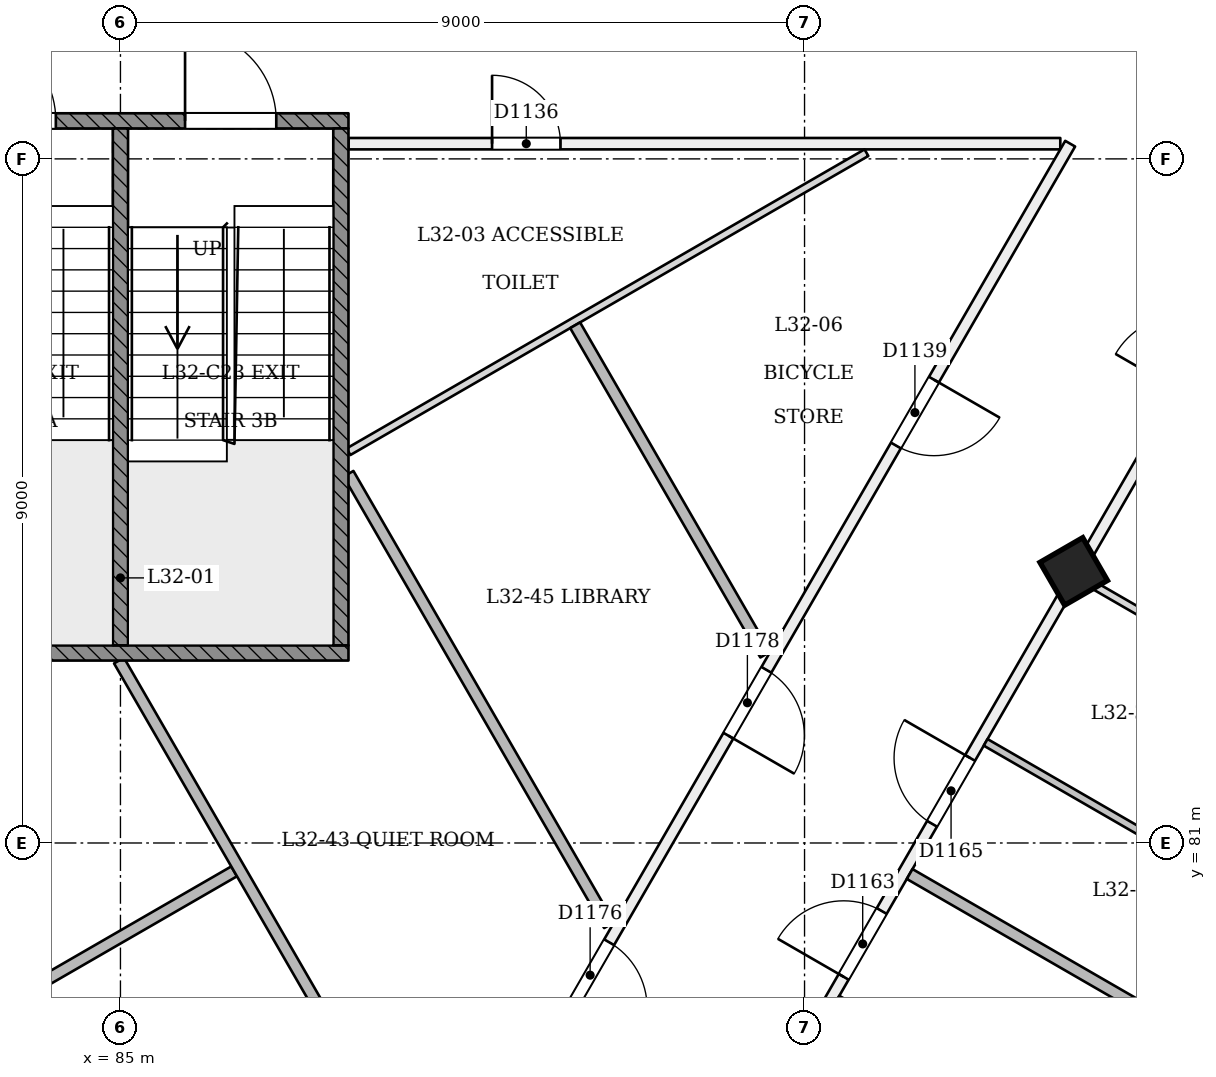
"""IFC4 building model, lengths in metres.
Left out: names, types, materials, properties, quantities, classifications, styles, units other than length and angle.
Written with IfcOpenShell. Run it as: python <this file> out.ifc"""

import sys

from ifc_helpers import new_model, si_unit, direction, frame, frame_2d, origin, origin_2d, place, context, subcontext, project, spatial, rectangle, extrude, element, fill, save


model = new_model("IFC4")
c1 = context("Model", 3, precision=1e-05, world=origin(), true_north=direction((0.0, 1.0)))
c2 = subcontext(c1, "Body", "Model", "MODEL_VIEW")
j1 = project(units=[si_unit("LENGTHUNIT", "METRE"), si_unit("PLANEANGLEUNIT", "RADIAN")], contexts=[c1])
p1 = place(None, origin())
s1 = spatial("IfcSite", under=j1, at=p1, CompositionType="ELEMENT")
p2 = place(p1, origin())
s2 = spatial("IfcBuilding", under=s1, at=p2, CompositionType="ELEMENT")
p3 = place(p2, frame((0.0, 0.0, 127.8)))
s3 = spatial("IfcBuildingStorey", under=s2, at=p3, CompositionType="ELEMENT", Elevation=127.8)
p4 = place(p3, frame((97.568, 84.526, -0.02), z_axis=(-0.02222134892, 0.038480872521, 0.999012229206), x_axis=(-0.500169939593, -0.865642180581, 0.022218162104)))
e1 = element("IfcColumn", 1, at=p4, inside=s3, PredefinedType="COLUMN", context=c2, shape_type="SweptSolid", body=[
    extrude(rectangle(XDim=0.65, YDim=0.65, at=origin_2d()), origin(), (0.0, 0.0, 1.0), 3.604),
])
p5 = place(p3, frame((85.0, 68.559, 0.0), z_axis=(0.0, 0.0, 1.0), x_axis=(-0.499999561005, 0.866025657238, 0.0)))
e2 = element("IfcWall", 2, at=p5, inside=s3, PredefinedType="PARTITIONING", context=c2, shape_type="SweptSolid", body=[
    extrude(rectangle(XDim=24.989, YDim=0.15, at=frame_2d((12.495, 0.0))), origin(), (0.0, 0.0, 1.0), 3.15),
])
p6 = place(p5, frame((2.515, 0.0, 0.0)))
e3 = element("IfcOpeningElement", 3, at=p6, cuts=e2, PredefinedType="OPENING", context=c2, shape_type="SweptSolid", body=[
    extrude(rectangle(XDim=0.9, YDim=2.1, at=frame_2d((0.45, 1.05))), frame((0.0, 0.085, 0.0), z_axis=(0.0, -1.0, 0.0), x_axis=(1.0, 0.0, 0.0)), (0.0, 0.0, 1.0), 0.171),
])
p7 = place(p5, frame((15.573, 0.0, 0.0)))
e4 = element("IfcOpeningElement", 4, at=p7, cuts=e2, PredefinedType="OPENING", context=c2, shape_type="SweptSolid", body=[
    extrude(rectangle(XDim=1.0, YDim=2.1, at=frame_2d((0.5, 1.05))), frame((0.0, 0.085, 0.0), z_axis=(0.0, -1.0, 0.0), x_axis=(1.0, 0.0, 0.0)), (0.0, 0.0, 1.0), 0.171),
])
p8 = place(p5, frame((7.186, 0.0, 0.0)))
e5 = element("IfcOpeningElement", 5, at=p8, cuts=e2, PredefinedType="OPENING", context=c2, shape_type="SweptSolid", body=[
    extrude(rectangle(XDim=1.0, YDim=2.1, at=frame_2d((0.5, 1.05))), frame((0.0, 0.085, 0.0), z_axis=(0.0, -1.0, 0.0), x_axis=(1.0, 0.0, 0.0)), (0.0, 0.0, 1.0), 0.171),
])
p9 = place(p5, frame((11.179, 0.0, 0.0)))
e6 = element("IfcOpeningElement", 6, at=p9, cuts=e2, PredefinedType="OPENING", context=c2, shape_type="SweptSolid", body=[
    extrude(rectangle(XDim=1.0, YDim=2.1, at=frame_2d((0.5, 1.05))), frame((0.0, 0.085, 0.0), z_axis=(0.0, -1.0, 0.0), x_axis=(1.0, 0.0, 0.0)), (0.0, 0.0, 1.0), 0.171),
])
p10 = place(p5, frame((20.607, 0.0, 0.0)))
e7 = element("IfcOpeningElement", 7, at=p10, cuts=e2, PredefinedType="OPENING", context=c2, shape_type="SweptSolid", body=[
    extrude(rectangle(XDim=1.0, YDim=2.1, at=frame_2d((0.5, 1.05))), frame((0.0, 0.085, 0.0), z_axis=(0.0, -1.0, 0.0), x_axis=(1.0, 0.0, 0.0)), (0.0, 0.0, 1.0), 0.171),
])
p11 = place(p3, frame((88.0, 90.2, 0.0), z_axis=(0.0, 0.0, 1.0), x_axis=(1.0, 0.0, 0.0)))
e8 = element("IfcWall", 8, at=p11, inside=s3, PredefinedType="PARTITIONING", context=c2, shape_type="SweptSolid", body=[
    extrude(rectangle(XDim=9.365, YDim=0.15, at=frame_2d((4.682, 0.0))), origin(), (0.0, 0.0, 1.0), 3.15),
])
p12 = place(p11, frame((1.889, 0.0, 0.0)))
e9 = element("IfcOpeningElement", 9, at=p12, cuts=e8, PredefinedType="OPENING", context=c2, shape_type="SweptSolid", body=[
    extrude(rectangle(XDim=0.9, YDim=2.1, at=frame_2d((0.45, 1.05))), frame((0.0, 0.085, 0.0), z_axis=(0.0, -1.0, 0.0), x_axis=(1.0, 0.0, 0.0)), (0.0, 0.0, 1.0), 0.171),
])
p13 = place(p3, frame((97.495, 90.2, 0.0), z_axis=(0.0, 0.0, 1.0), x_axis=(-0.500000725976, -0.866024984641, 0.0)))
e10 = element("IfcWall", 10, at=p13, inside=s3, PredefinedType="PARTITIONING", context=c2, shape_type="SweptSolid", body=[
    extrude(rectangle(XDim=24.859, YDim=0.15, at=frame_2d((12.43, 0.0))), origin(), (0.0, 0.0, 1.0), 3.15),
])
p14 = place(p13, frame((17.98, 0.0, 0.0)))
e11 = element("IfcOpeningElement", 11, at=p14, cuts=e10, PredefinedType="OPENING", context=c2, shape_type="SweptSolid", body=[
    extrude(rectangle(XDim=1.0, YDim=2.1, at=frame_2d((0.5, 1.05))), frame((0.0, 0.085, 0.0), z_axis=(0.0, -1.0, 0.0), x_axis=(1.0, 0.0, 0.0)), (0.0, 0.0, 1.0), 0.171),
])
p15 = place(p13, frame((3.585, 0.0, 0.0)))
e12 = element("IfcOpeningElement", 12, at=p15, cuts=e10, PredefinedType="OPENING", context=c2, shape_type="SweptSolid", body=[
    extrude(rectangle(XDim=1.0, YDim=2.1, at=frame_2d((0.5, 1.05))), frame((0.0, 0.085, 0.0), z_axis=(0.0, -1.0, 0.0), x_axis=(1.0, 0.0, 0.0)), (0.0, 0.0, 1.0), 0.171),
])
p16 = place(p13, frame((12.131, 0.0, 0.0)))
e13 = element("IfcOpeningElement", 13, at=p16, cuts=e10, PredefinedType="OPENING", context=c2, shape_type="SweptSolid", body=[
    extrude(rectangle(XDim=1.0, YDim=2.1, at=frame_2d((0.5, 1.05))), frame((0.0, 0.085, 0.0), z_axis=(0.0, -1.0, 0.0), x_axis=(1.0, 0.0, 0.0)), (0.0, 0.0, 1.0), 0.171),
])
p17 = place(p13, frame((7.993, 0.0, 0.0)))
e14 = element("IfcOpeningElement", 14, at=p17, cuts=e10, PredefinedType="OPENING", context=c2, shape_type="SweptSolid", body=[
    extrude(rectangle(XDim=1.0, YDim=2.1, at=frame_2d((0.5, 1.05))), frame((0.0, 0.085, 0.0), z_axis=(0.0, -1.0, 0.0), x_axis=(1.0, 0.0, 0.0)), (0.0, 0.0, 1.0), 0.171),
])
p18 = place(p3, frame((64.534, 98.206, 0.0), z_axis=(0.0, 0.0, 1.0), x_axis=(0.499999603446, -0.866025632735, 0.0)))
e15 = element("IfcWall", 15, at=p18, inside=s3, PredefinedType="PARTITIONING", context=c2, shape_type="SweptSolid", body=[
    extrude(rectangle(XDim=40.592, YDim=0.15, at=frame_2d((20.296, 0.0))), origin(), (0.0, 0.0, 1.0), 2.75),
])
p19 = place(p18, frame((0.2, 0.0, 0.0)))
e16 = element("IfcOpeningElement", 16, at=p19, cuts=e15, PredefinedType="OPENING", context=c2, shape_type="SweptSolid", body=[
    extrude(rectangle(XDim=1.2, YDim=2.1, at=frame_2d((0.6, 1.05))), frame((0.0, 0.085, 0.0), z_axis=(0.0, -1.0, 0.0), x_axis=(1.0, 0.0, 0.0)), (0.0, 0.0, 1.0), 0.171),
])
p20 = place(p18, frame((3.016, 0.0, 0.0)))
e17 = element("IfcOpeningElement", 17, at=p20, cuts=e15, PredefinedType="OPENING", context=c2, shape_type="SweptSolid", body=[
    extrude(rectangle(XDim=1.0, YDim=2.1, at=frame_2d((0.5, 1.05))), frame((0.0, 0.085, 0.0), z_axis=(0.0, -1.0, 0.0), x_axis=(1.0, 0.0, 0.0)), (0.0, 0.0, 1.0), 0.171),
])
p21 = place(p18, frame((9.691, 0.0, 0.0)))
e18 = element("IfcOpeningElement", 18, at=p21, cuts=e15, PredefinedType="OPENING", context=c2, shape_type="SweptSolid", body=[
    extrude(rectangle(XDim=1.0, YDim=2.1, at=frame_2d((0.5, 1.05))), frame((0.0, 0.085, 0.0), z_axis=(0.0, -1.0, 0.0), x_axis=(1.0, 0.0, 0.0)), (0.0, 0.0, 1.0), 0.171),
])
p22 = place(p18, frame((11.901, 0.0, 0.0)))
e19 = element("IfcOpeningElement", 19, at=p22, cuts=e15, PredefinedType="OPENING", context=c2, shape_type="SweptSolid", body=[
    extrude(rectangle(XDim=1.0, YDim=2.1, at=frame_2d((0.5, 1.05))), frame((0.0, 0.085, 0.0), z_axis=(0.0, -1.0, 0.0), x_axis=(1.0, 0.0, 0.0)), (0.0, 0.0, 1.0), 0.171),
])
p23 = place(p18, frame((18.576, 0.0, 0.0)))
e20 = element("IfcOpeningElement", 20, at=p23, cuts=e15, PredefinedType="OPENING", context=c2, shape_type="SweptSolid", body=[
    extrude(rectangle(XDim=1.0, YDim=2.1, at=frame_2d((0.5, 1.05))), frame((0.0, 0.085, 0.0), z_axis=(0.0, -1.0, 0.0), x_axis=(1.0, 0.0, 0.0)), (0.0, 0.0, 1.0), 0.171),
])
p24 = place(p18, frame((22.046, 0.0, 0.0)))
e21 = element("IfcOpeningElement", 21, at=p24, cuts=e15, PredefinedType="OPENING", context=c2, shape_type="SweptSolid", body=[
    extrude(rectangle(XDim=1.0, YDim=2.1, at=frame_2d((0.5, 1.05))), frame((0.0, 0.085, 0.0), z_axis=(0.0, -1.0, 0.0), x_axis=(1.0, 0.0, 0.0)), (0.0, 0.0, 1.0), 0.171),
])
p25 = place(p18, frame((27.576, 0.0, 0.0)))
e22 = element("IfcOpeningElement", 22, at=p25, cuts=e15, PredefinedType="OPENING", context=c2, shape_type="SweptSolid", body=[
    extrude(rectangle(XDim=1.0, YDim=2.1, at=frame_2d((0.5, 1.05))), frame((0.0, 0.085, 0.0), z_axis=(0.0, -1.0, 0.0), x_axis=(1.0, 0.0, 0.0)), (0.0, 0.0, 1.0), 0.171),
])
p26 = place(p18, frame((31.046, 0.0, 0.0)))
e23 = element("IfcOpeningElement", 23, at=p26, cuts=e15, PredefinedType="OPENING", context=c2, shape_type="SweptSolid", body=[
    extrude(rectangle(XDim=1.0, YDim=2.1, at=frame_2d((0.5, 1.05))), frame((0.0, 0.085, 0.0), z_axis=(0.0, -1.0, 0.0), x_axis=(1.0, 0.0, 0.0)), (0.0, 0.0, 1.0), 0.171),
])
p27 = place(p18, frame((36.576, 0.0, 0.0)))
e24 = element("IfcOpeningElement", 24, at=p27, cuts=e15, PredefinedType="OPENING", context=c2, shape_type="SweptSolid", body=[
    extrude(rectangle(XDim=1.0, YDim=2.1, at=frame_2d((0.5, 1.05))), frame((0.0, 0.085, 0.0), z_axis=(0.0, -1.0, 0.0), x_axis=(1.0, 0.0, 0.0)), (0.0, 0.0, 1.0), 0.171),
])
p28 = place(p18, frame((39.323, 0.0, 0.0)))
e25 = element("IfcOpeningElement", 25, at=p28, cuts=e15, PredefinedType="OPENING", context=c2, shape_type="SweptSolid", body=[
    extrude(rectangle(XDim=1.0, YDim=2.1, at=frame_2d((0.5, 1.05))), frame((0.0, 0.085, 0.0), z_axis=(0.0, -1.0, 0.0), x_axis=(1.0, 0.0, 0.0)), (0.0, 0.0, 1.0), 0.171),
])
p29 = place(p3, frame((85.17, 63.052, 0.0), z_axis=(0.0, 0.0, 1.0), x_axis=(0.499999603446, 0.866025632735, 0.0)))
e26 = element("IfcWall", 26, at=p29, inside=s3, PredefinedType="PARTITIONING", context=c2, shape_type="SweptSolid", body=[
    extrude(rectangle(XDim=40.592, YDim=0.15, at=frame_2d((20.296, 0.0))), origin(), (0.0, 0.0, 1.0), 2.75),
])
p30 = place(p29, frame((0.273, 0.0, 0.0)))
e27 = element("IfcOpeningElement", 27, at=p30, cuts=e26, PredefinedType="OPENING", context=c2, shape_type="SweptSolid", body=[
    extrude(rectangle(XDim=1.2, YDim=2.1, at=frame_2d((0.6, 1.05))), frame((0.0, 0.085, 0.0), z_axis=(0.0, -1.0, 0.0), x_axis=(1.0, 0.0, 0.0)), (0.0, 0.0, 1.0), 0.171),
])
p31 = place(p29, frame((4.046, 0.0, 0.0)))
e28 = element("IfcOpeningElement", 28, at=p31, cuts=e26, PredefinedType="OPENING", context=c2, shape_type="SweptSolid", body=[
    extrude(rectangle(XDim=1.0, YDim=2.1, at=frame_2d((0.5, 1.05))), frame((0.0, 0.085, 0.0), z_axis=(0.0, -1.0, 0.0), x_axis=(1.0, 0.0, 0.0)), (0.0, 0.0, 1.0), 0.171),
])
p32 = place(p29, frame((9.576, 0.0, 0.0)))
e29 = element("IfcOpeningElement", 29, at=p32, cuts=e26, PredefinedType="OPENING", context=c2, shape_type="SweptSolid", body=[
    extrude(rectangle(XDim=1.0, YDim=2.1, at=frame_2d((0.5, 1.05))), frame((0.0, 0.085, 0.0), z_axis=(0.0, -1.0, 0.0), x_axis=(1.0, 0.0, 0.0)), (0.0, 0.0, 1.0), 0.171),
])
p33 = place(p29, frame((11.901, 0.0, 0.0)))
e30 = element("IfcOpeningElement", 30, at=p33, cuts=e26, PredefinedType="OPENING", context=c2, shape_type="SweptSolid", body=[
    extrude(rectangle(XDim=1.0, YDim=2.1, at=frame_2d((0.5, 1.05))), frame((0.0, 0.085, 0.0), z_axis=(0.0, -1.0, 0.0), x_axis=(1.0, 0.0, 0.0)), (0.0, 0.0, 1.0), 0.171),
])
p34 = place(p29, frame((18.691, 0.0, 0.0)))
e31 = element("IfcOpeningElement", 31, at=p34, cuts=e26, PredefinedType="OPENING", context=c2, shape_type="SweptSolid", body=[
    extrude(rectangle(XDim=1.0, YDim=2.1, at=frame_2d((0.5, 1.05))), frame((0.0, 0.085, 0.0), z_axis=(0.0, -1.0, 0.0), x_axis=(1.0, 0.0, 0.0)), (0.0, 0.0, 1.0), 0.171),
])
p35 = place(p29, frame((21.016, 0.0, 0.0)))
e32 = element("IfcOpeningElement", 32, at=p35, cuts=e26, PredefinedType="OPENING", context=c2, shape_type="SweptSolid", body=[
    extrude(rectangle(XDim=1.0, YDim=2.1, at=frame_2d((0.5, 1.05))), frame((0.0, 0.085, 0.0), z_axis=(0.0, -1.0, 0.0), x_axis=(1.0, 0.0, 0.0)), (0.0, 0.0, 1.0), 0.171),
])
p36 = place(p29, frame((27.576, 0.0, 0.0)))
e33 = element("IfcOpeningElement", 33, at=p36, cuts=e26, PredefinedType="OPENING", context=c2, shape_type="SweptSolid", body=[
    extrude(rectangle(XDim=1.0, YDim=2.1, at=frame_2d((0.5, 1.05))), frame((0.0, 0.085, 0.0), z_axis=(0.0, -1.0, 0.0), x_axis=(1.0, 0.0, 0.0)), (0.0, 0.0, 1.0), 0.171),
])
p37 = place(p29, frame((30.016, 0.0, 0.0)))
e34 = element("IfcOpeningElement", 34, at=p37, cuts=e26, PredefinedType="OPENING", context=c2, shape_type="SweptSolid", body=[
    extrude(rectangle(XDim=1.0, YDim=2.1, at=frame_2d((0.5, 1.05))), frame((0.0, 0.085, 0.0), z_axis=(0.0, -1.0, 0.0), x_axis=(1.0, 0.0, 0.0)), (0.0, 0.0, 1.0), 0.171),
])
p38 = place(p29, frame((39.192, 0.0, 0.0)))
e35 = element("IfcOpeningElement", 35, at=p38, cuts=e26, PredefinedType="OPENING", context=c2, shape_type="SweptSolid", body=[
    extrude(rectangle(XDim=1.2, YDim=2.1, at=frame_2d((0.6, 1.05))), frame((0.0, 0.085, 0.0), z_axis=(0.0, -1.0, 0.0), x_axis=(1.0, 0.0, 0.0)), (0.0, 0.0, 1.0), 0.171),
])
p39 = place(p3, frame((88.0, 86.147, 0.0), z_axis=(0.0, 0.0, 1.0), x_axis=(0.866017656312, 0.500013418776, 0.0)))
e36 = element("IfcWall", 36, at=p39, inside=s3, PredefinedType="PARTITIONING", context=c2, shape_type="SweptSolid", body=[
    extrude(rectangle(XDim=7.868, YDim=0.1, at=frame_2d((3.934, 0.0))), origin(), (0.0, 0.0, 1.0), 3.15),
])
p40 = place(p3, frame((90.982, 87.811, 0.0), z_axis=(0.0, 0.0, 1.0), x_axis=(0.500022324899, -0.866012514114, 0.0)))
e37 = element("IfcWall", 37, at=p40, inside=s3, PredefinedType="PARTITIONING", context=c2, shape_type="SweptSolid", body=[
    extrude(rectangle(XDim=5.004, YDim=0.15, at=frame_2d((2.502, 0.0))), origin(), (0.0, 0.0, 1.0), 3.15),
])
p41 = place(p3, frame((94.433, 78.946, 0.0), z_axis=(0.0, 0.0, 1.0), x_axis=(0.866046596414, -0.499963291492, 0.0)))
e38 = element("IfcWall", 38, at=p41, inside=s3, PredefinedType="PARTITIONING", context=c2, shape_type="SweptSolid", body=[
    extrude(rectangle(XDim=2.925, YDim=0.1, at=frame_2d((1.462, 0.0))), origin(), (0.0, 0.0, 1.0), 3.15),
])
p42 = place(p3, frame((100.878, 77.419, 0.0), z_axis=(0.0, 0.0, 1.0), x_axis=(-0.866025401434, 0.500000004071, 0.0)))
e39 = element("IfcWall", 39, at=p42, inside=s3, PredefinedType="PARTITIONING", context=c2, shape_type="SweptSolid", body=[
    extrude(rectangle(XDim=6.345, YDim=0.15, at=frame_2d((3.173, 0.0))), origin(), (0.0, 0.0, 1.0), 2.65),
])
p43 = place(p3, frame((98.829, 80.911, 0.0), z_axis=(0.0, 0.0, 1.0), x_axis=(-0.866048868473, 0.499959355765, 0.0)))
e40 = element("IfcWall", 40, at=p43, inside=s3, PredefinedType="PARTITIONING", context=c2, shape_type="SweptSolid", body=[
    extrude(rectangle(XDim=2.825, YDim=0.1, at=frame_2d((1.413, 0.0))), origin(), (0.0, 0.0, 1.0), 3.15),
])
p44 = place(p3, frame((100.036, 83.101, 0.0), z_axis=(0.0, 0.0, 1.0), x_axis=(-0.86600392025, 0.500037208726, 0.0)))
e41 = element("IfcWall", 41, at=p44, inside=s3, PredefinedType="PARTITIONING", context=c2, shape_type="SweptSolid", body=[
    extrude(rectangle(XDim=2.775, YDim=0.1, at=frame_2d((1.388, 0.0))), origin(), (0.0, 0.0, 1.0), 2.75),
])
p45 = place(p3, frame((86.495, 80.627, 0.0), z_axis=(0.0, 0.0, 1.0), x_axis=(-0.866016326422, -0.500015722123, 0.0)))
e42 = element("IfcWall", 42, at=p45, inside=s3, PredefinedType="PARTITIONING", context=c2, shape_type="SweptSolid", body=[
    extrude(rectangle(XDim=7.254, YDim=0.15, at=frame_2d((3.627, 0.0))), origin(), (0.0, 0.0, 1.0), 3.15),
])
p46 = place(p3, frame((88.54, 77.235, 0.0), z_axis=(0.0, 0.0, 1.0), x_axis=(-0.500019316528, 0.866014251095, 0.0)))
e43 = element("IfcWall", 43, at=p46, inside=s3, PredefinedType="PARTITIONING", context=c2, shape_type="SweptSolid", body=[
    extrude(rectangle(XDim=7.119, YDim=0.15, at=frame_2d((3.56, 0.0))), origin(), (0.0, 0.0, 1.0), 3.15),
])
p47 = place(p3, frame((91.429, 79.918, 0.0), z_axis=(0.0, 0.0, 1.0), x_axis=(-0.499998790464, 0.86602610211, 0.0)))
e44 = element("IfcWall", 44, at=p47, inside=s3, PredefinedType="PARTITIONING", context=c2, shape_type="SweptSolid", body=[
    extrude(rectangle(XDim=6.857, YDim=0.15, at=frame_2d((3.429, 0.0))), origin(), (0.0, 0.0, 1.0), 3.15),
])
p48 = place(p3, frame((82.0, 90.5, 0.0), z_axis=(0.0, 0.0, 1.0), x_axis=(1.0, 0.0, 0.0)))
e45 = element("IfcWall", 45, at=p48, inside=s3, PredefinedType="SOLIDWALL", context=c2, shape_type="SweptSolid", body=[
    extrude(rectangle(XDim=6.0, YDim=0.2, at=frame_2d((3.0, 0.0))), origin(), (0.0, 0.0, 1.0), 3.15),
])
p49 = place(p48, frame((0.95, 0.0, 0.0)))
e46 = element("IfcOpeningElement", 46, at=p49, cuts=e45, PredefinedType="OPENING", context=c2, shape_type="SweptSolid", body=[
    extrude(rectangle(XDim=1.2, YDim=2.1, at=frame_2d((0.6, 1.05))), frame((0.0, 0.11, 0.0), z_axis=(0.0, -1.0, 0.0), x_axis=(1.0, 0.0, 0.0)), (0.0, 0.0, 1.0), 0.221),
])
p50 = place(p48, frame((3.85, 0.0, 0.0)))
e47 = element("IfcOpeningElement", 47, at=p50, cuts=e45, PredefinedType="OPENING", context=c2, shape_type="SweptSolid", body=[
    extrude(rectangle(XDim=1.2, YDim=2.1, at=frame_2d((0.6, 1.05))), frame((0.0, 0.11, 0.0), z_axis=(0.0, -1.0, 0.0), x_axis=(1.0, 0.0, 0.0)), (0.0, 0.0, 1.0), 0.221),
])
p51 = place(p3, frame((82.0, 83.5, 0.0), z_axis=(0.0, 0.0, 1.0), x_axis=(1.0, 0.0, 0.0)))
e48 = element("IfcWall", 48, at=p51, inside=s3, PredefinedType="SOLIDWALL", context=c2, shape_type="SweptSolid", body=[
    extrude(rectangle(XDim=6.0, YDim=0.2, at=frame_2d((3.0, 0.0))), origin(), (0.0, 0.0, 1.0), 3.15),
])
for number, where, z_axis, x_axis in (
    (49, (87.9, 83.6, 0.0), (0.0, 0.0, 1.0), (0.0, 1.0, 0.0)),
    (50, (85.0, 83.6, 0.0), (0.0, 0.0, 1.0), (0.0, 1.0, 0.0)),
):
    element("IfcWall", number, at=place(p3, frame(where, z_axis=z_axis, x_axis=x_axis)), inside=s3, PredefinedType="SOLIDWALL", context=c2, shape_type="SweptSolid", body=[
        extrude(rectangle(XDim=6.8, YDim=0.2, at=frame_2d((3.4, 0.0))), origin(), (0.0, 0.0, 1.0), 3.15),
    ])
p52 = place(p12, origin())
e51 = element("IfcDoor", 51, at=p52, inside=s3, OperationType="SINGLE_SWING_LEFT", PredefinedType="NOTDEFINED", context=c2, shape_type="SweptSolid", body=[
    extrude(rectangle(XDim=0.9, YDim=2.1, at=frame_2d((0.45, 1.05))), frame((0.0, 0.025, 0.0), z_axis=(0.0, -1.0, 0.0), x_axis=(1.0, 0.0, 0.0)), (0.0, 0.0, 1.0), 0.05),
])
fill(e9, e51)
p53 = place(p15, origin())
e52 = element("IfcDoor", 52, at=p53, inside=s3, OperationType="SINGLE_SWING_LEFT", PredefinedType="NOTDEFINED", context=c2, shape_type="SweptSolid", body=[
    extrude(rectangle(XDim=1.0, YDim=2.1, at=frame_2d((0.5, 1.05))), frame((0.0, 0.025, 0.0), z_axis=(0.0, -1.0, 0.0), x_axis=(1.0, 0.0, 0.0)), (0.0, 0.0, 1.0), 0.05),
])
fill(e12, e52)
p54 = place(p34, origin())
e53 = element("IfcDoor", 53, at=p54, inside=s3, OperationType="SINGLE_SWING_LEFT", PredefinedType="NOTDEFINED", context=c2, shape_type="SweptSolid", body=[
    extrude(rectangle(XDim=1.0, YDim=2.1, at=frame_2d((0.5, 1.05))), frame((0.0, 0.025, 0.0), z_axis=(0.0, -1.0, 0.0), x_axis=(1.0, 0.0, 0.0)), (0.0, 0.0, 1.0), 0.05),
])
fill(e31, e53)
p55 = place(p35, origin())
e54 = element("IfcDoor", 54, at=p55, inside=s3, OperationType="SINGLE_SWING_RIGHT", PredefinedType="NOTDEFINED", context=c2, shape_type="SweptSolid", body=[
    extrude(rectangle(XDim=1.0, YDim=2.1, at=frame_2d((0.5, 1.05))), frame((0.0, 0.025, 0.0), z_axis=(0.0, -1.0, 0.0), x_axis=(1.0, 0.0, 0.0)), (0.0, 0.0, 1.0), 0.05),
])
fill(e32, e54)
p56 = place(p16, origin())
e55 = element("IfcDoor", 55, at=p56, inside=s3, OperationType="SINGLE_SWING_RIGHT", PredefinedType="NOTDEFINED", context=c2, shape_type="SweptSolid", body=[
    extrude(rectangle(XDim=1.0, YDim=2.1, at=frame_2d((0.5, 1.05))), frame((0.0, 0.025, 0.0), z_axis=(0.0, -1.0, 0.0), x_axis=(1.0, 0.0, 0.0)), (0.0, 0.0, 1.0), 0.05),
])
fill(e13, e55)
p57 = place(p17, origin())
e56 = element("IfcDoor", 56, at=p57, inside=s3, OperationType="SINGLE_SWING_RIGHT", PredefinedType="NOTDEFINED", context=c2, shape_type="SweptSolid", body=[
    extrude(rectangle(XDim=1.0, YDim=2.1, at=frame_2d((0.5, 1.05))), frame((0.0, 0.025, 0.0), z_axis=(0.0, -1.0, 0.0), x_axis=(1.0, 0.0, 0.0)), (0.0, 0.0, 1.0), 0.05),
])
fill(e14, e56)
p58 = place(p49, origin())
e57 = element("IfcDoor", 57, at=p58, inside=s3, OperationType="SINGLE_SWING_LEFT", PredefinedType="NOTDEFINED", context=c2, shape_type="SweptSolid", body=[
    extrude(rectangle(XDim=1.2, YDim=2.1, at=frame_2d((0.6, 1.05))), frame((0.0, 0.025, 0.0), z_axis=(0.0, -1.0, 0.0), x_axis=(1.0, 0.0, 0.0)), (0.0, 0.0, 1.0), 0.05),
])
fill(e46, e57)
p59 = place(p50, origin())
e58 = element("IfcDoor", 58, at=p59, inside=s3, OperationType="SINGLE_SWING_LEFT", PredefinedType="NOTDEFINED", context=c2, shape_type="SweptSolid", body=[
    extrude(rectangle(XDim=1.2, YDim=2.1, at=frame_2d((0.6, 1.05))), frame((0.0, 0.025, 0.0), z_axis=(0.0, -1.0, 0.0), x_axis=(1.0, 0.0, 0.0)), (0.0, 0.0, 1.0), 0.05),
])
fill(e47, e58)
save(model, sys.argv[1])
